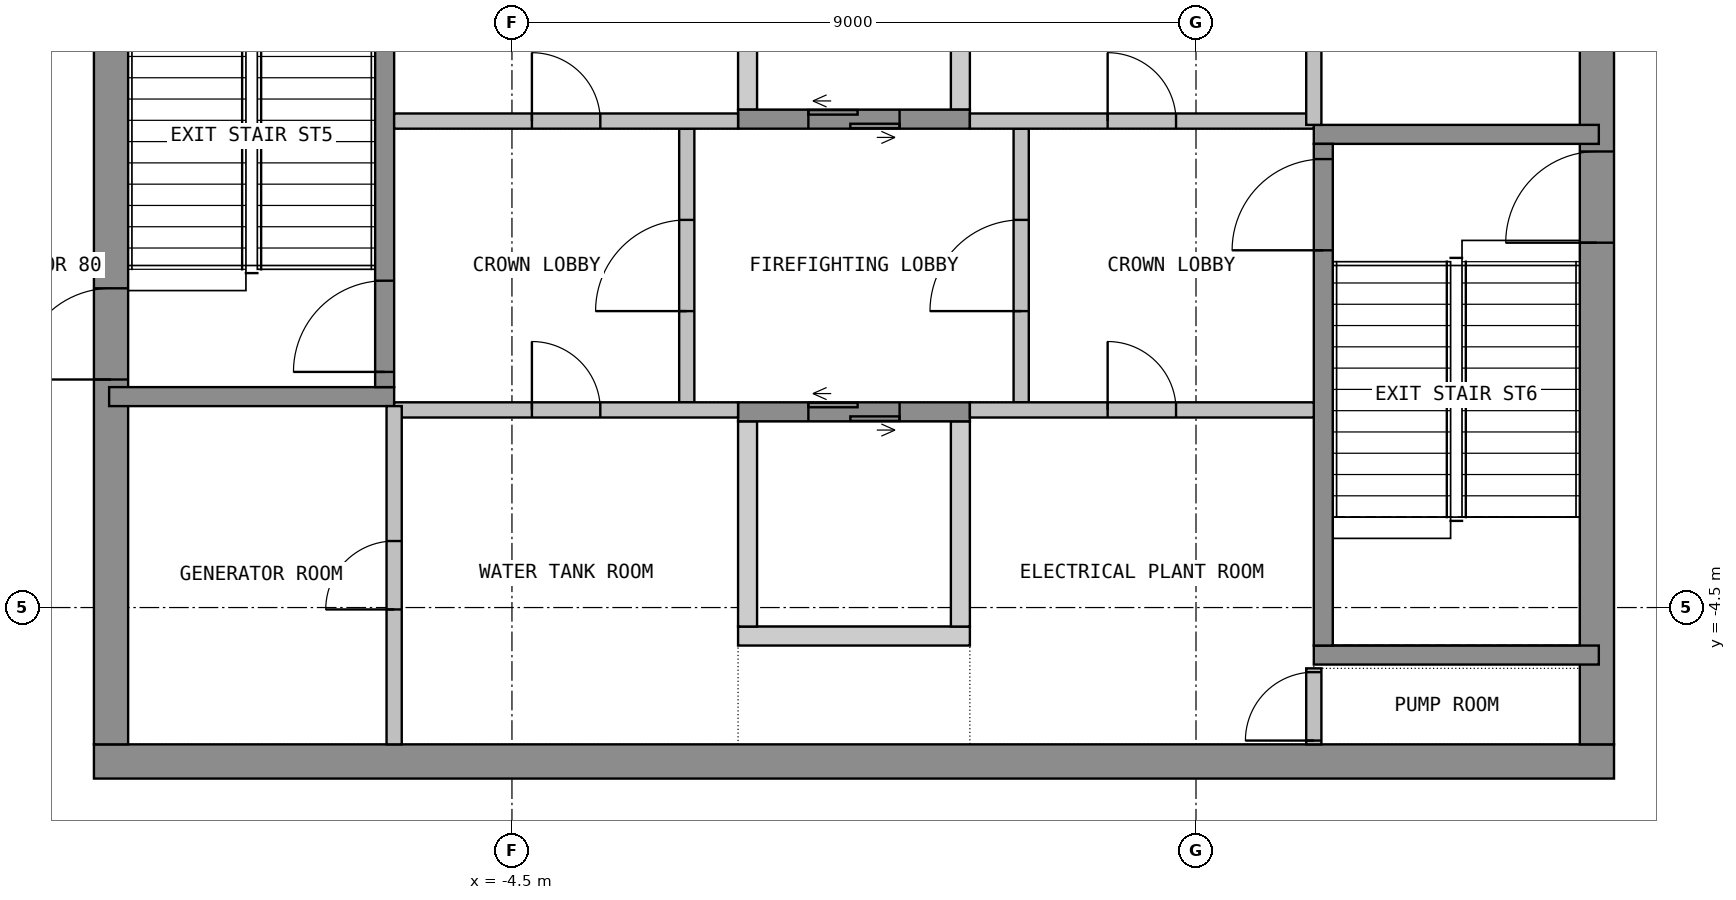
"""IFC4 building model, lengths in metres.
Left out: names, types, materials, properties, quantities, classifications, styles, units other than length and angle.
Written with IfcOpenShell. Run it as: python <this file> out.ifc"""

import sys

from ifc_helpers import new_model, si_unit, direction, frame, frame_2d, origin, place, context, subcontext, project, spatial, polyline, rectangle, outline, extrude, element, fill, save


model = new_model("IFC4")
c1 = context("Model", 3, precision=1e-05, world=origin(), true_north=direction((0.0, 1.0)))
c2 = subcontext(c1, "Body", "Model", "MODEL_VIEW")
j1 = project(units=[si_unit("LENGTHUNIT", "METRE"), si_unit("PLANEANGLEUNIT", "RADIAN")], contexts=[c1])
p1 = place(None, origin())
s1 = spatial("IfcSite", under=j1, at=p1, CompositionType="ELEMENT")
p2 = place(p1, origin())
s2 = spatial("IfcBuilding", under=s1, at=p2, CompositionType="ELEMENT")
p3 = place(p2, frame((0.0, 0.0, 327.9)))
s3 = spatial("IfcBuildingStorey", under=s2, at=p3, CompositionType="ELEMENT", Elevation=327.9)
p4 = place(p3, frame((-10.0, -6.525, 0.0), z_axis=(0.0, 0.0, 1.0), x_axis=(1.0, 0.0, 0.0)))
e1 = element("IfcWall", 1, at=p4, inside=s3, PredefinedType="SHEAR", context=c2, shape_type="SweptSolid", body=[
    extrude(rectangle(XDim=20.0, YDim=0.45, at=frame_2d((10.0, 0.0))), origin(), (0.0, 0.0, 1.0), 3.6),
])
p5 = place(p3, frame((-9.775, -6.3, 0.0), z_axis=(0.0, 0.0, 1.0), x_axis=(0.0, 1.0, 0.0)))
e2 = element("IfcWall", 2, at=p5, inside=s3, PredefinedType="SHEAR", context=c2, shape_type="SweptSolid", body=[
    extrude(rectangle(XDim=12.6, YDim=0.45, at=frame_2d((6.3, 0.0))), origin(), (0.0, 0.0, 1.0), 3.6),
])
p6 = place(p5, frame((4.8, 0.0, 0.0)))
e3 = element("IfcOpeningElement", 3, at=p6, cuts=e2, PredefinedType="OPENING", context=c2, shape_type="SweptSolid", body=[
    extrude(rectangle(XDim=1.2, YDim=2.1, at=frame_2d((0.6, 1.05))), frame((0.0, 0.235, 0.0), z_axis=(0.0, -1.0, 0.0), x_axis=(1.0, 0.0, 0.0)), (0.0, 0.0, 1.0), 0.47),
])
p7 = place(p3, frame((9.775, -6.3, 0.0), z_axis=(0.0, 0.0, 1.0), x_axis=(0.0, 1.0, 0.0)))
e4 = element("IfcWall", 4, at=p7, inside=s3, PredefinedType="SHEAR", context=c2, shape_type="SweptSolid", body=[
    extrude(rectangle(XDim=12.6, YDim=0.45, at=frame_2d((6.3, 0.0))), origin(), (0.0, 0.0, 1.0), 3.6),
])
p8 = place(p7, frame((6.6, 0.0, 0.0)))
e5 = element("IfcOpeningElement", 5, at=p8, cuts=e4, PredefinedType="OPENING", context=c2, shape_type="SweptSolid", body=[
    extrude(rectangle(XDim=1.2, YDim=2.1, at=frame_2d((0.6, 1.05))), frame((0.0, 0.235, 0.0), z_axis=(0.0, -1.0, 0.0), x_axis=(1.0, 0.0, 0.0)), (0.0, 0.0, 1.0), 0.47),
])
p9 = place(p3, origin())
e6 = element("IfcWall", 6, at=p9, inside=s3, PredefinedType="SHEAR", context=c2, shape_type="SweptSolid", body=[
    extrude(outline(polyline([(-1.525, 2.05), (-1.275, 2.05), (-1.275, 4.75), (-1.525, 4.75), (-1.525, 2.05)])), origin(), (0.0, 0.0, 1.0), 3.6),
])
p10 = place(p3, origin())
e7 = element("IfcWall", 7, at=p10, inside=s3, PredefinedType="SHEAR", context=c2, shape_type="SweptSolid", body=[
    extrude(outline(polyline([(1.275, 2.05), (1.525, 2.05), (1.525, 4.75), (1.275, 4.75), (1.275, 2.05)])), origin(), (0.0, 0.0, 1.0), 3.6),
])
p11 = place(p3, frame((-1.525, 1.925, 0.0), z_axis=(0.0, 0.0, 1.0), x_axis=(1.0, 0.0, 0.0)))
e8 = element("IfcWall", 8, at=p11, inside=s3, PredefinedType="SHEAR", context=c2, shape_type="SweptSolid", body=[
    extrude(rectangle(XDim=3.05, YDim=0.25, at=frame_2d((1.525, 0.0))), origin(), (0.0, 0.0, 1.0), 3.6),
])
p12 = place(p11, frame((0.925, 0.0, 0.0)))
e9 = element("IfcOpeningElement", 9, at=p12, cuts=e8, PredefinedType="OPENING", context=c2, shape_type="SweptSolid", body=[
    extrude(rectangle(XDim=1.2, YDim=2.1, at=frame_2d((0.6, 1.05))), frame((0.0, 0.135, 0.0), z_axis=(0.0, -1.0, 0.0), x_axis=(1.0, 0.0, 0.0)), (0.0, 0.0, 1.0), 0.27),
])
p13 = place(p3, origin())
e10 = element("IfcWall", 10, at=p13, inside=s3, PredefinedType="SHEAR", context=c2, shape_type="SweptSolid", body=[
    extrude(outline(polyline([(-1.525, -5.0), (1.525, -5.0), (1.525, -4.75), (-1.525, -4.75), (-1.525, -5.0)])), origin(), (0.0, 0.0, 1.0), 3.6),
])
p14 = place(p3, origin())
e11 = element("IfcWall", 11, at=p14, inside=s3, PredefinedType="SHEAR", context=c2, shape_type="SweptSolid", body=[
    extrude(outline(polyline([(-1.525, -4.75), (-1.275, -4.75), (-1.275, -2.05), (-1.525, -2.05), (-1.525, -4.75)])), origin(), (0.0, 0.0, 1.0), 3.6),
])
p15 = place(p3, origin())
e12 = element("IfcWall", 12, at=p15, inside=s3, PredefinedType="SHEAR", context=c2, shape_type="SweptSolid", body=[
    extrude(outline(polyline([(1.275, -4.75), (1.525, -4.75), (1.525, -2.05), (1.275, -2.05), (1.275, -4.75)])), origin(), (0.0, 0.0, 1.0), 3.6),
])
p16 = place(p3, frame((-1.525, -1.925, 0.0), z_axis=(0.0, 0.0, 1.0), x_axis=(1.0, 0.0, 0.0)))
e13 = element("IfcWall", 13, at=p16, inside=s3, PredefinedType="SHEAR", context=c2, shape_type="SweptSolid", body=[
    extrude(rectangle(XDim=3.05, YDim=0.25, at=frame_2d((1.525, 0.0))), origin(), (0.0, 0.0, 1.0), 3.6),
])
p17 = place(p16, frame((0.925, 0.0, 0.0)))
e14 = element("IfcOpeningElement", 14, at=p17, cuts=e13, PredefinedType="OPENING", context=c2, shape_type="SweptSolid", body=[
    extrude(rectangle(XDim=1.2, YDim=2.1, at=frame_2d((0.6, 1.05))), frame((0.0, 0.135, 0.0), z_axis=(0.0, -1.0, 0.0), x_axis=(1.0, 0.0, 0.0)), (0.0, 0.0, 1.0), 0.27),
])
p18 = place(p3, frame((-2.2, -1.8, 0.0), z_axis=(0.0, 0.0, 1.0), x_axis=(0.0, 1.0, 0.0)))
e15 = element("IfcWall", 15, at=p18, inside=s3, PredefinedType="PARTITIONING", context=c2, shape_type="SweptSolid", body=[
    extrude(rectangle(XDim=3.6, YDim=0.2, at=frame_2d((1.8, 0.0))), origin(), (0.0, 0.0, 1.0), 3.6),
])
p19 = place(p18, frame((1.2, 0.0, 0.0)))
e16 = element("IfcOpeningElement", 16, at=p19, cuts=e15, PredefinedType="OPENING", context=c2, shape_type="SweptSolid", body=[
    extrude(rectangle(XDim=1.2, YDim=2.1, at=frame_2d((0.6, 1.05))), frame((0.0, 0.11, 0.0), z_axis=(0.0, -1.0, 0.0), x_axis=(1.0, 0.0, 0.0)), (0.0, 0.0, 1.0), 0.22),
])
p20 = place(p3, frame((2.2, -1.8, 0.0), z_axis=(0.0, 0.0, 1.0), x_axis=(0.0, 1.0, 0.0)))
e17 = element("IfcWall", 17, at=p20, inside=s3, PredefinedType="PARTITIONING", context=c2, shape_type="SweptSolid", body=[
    extrude(rectangle(XDim=3.6, YDim=0.2, at=frame_2d((1.8, 0.0))), origin(), (0.0, 0.0, 1.0), 3.6),
])
p21 = place(p20, frame((1.2, 0.0, 0.0)))
e18 = element("IfcOpeningElement", 18, at=p21, cuts=e17, PredefinedType="OPENING", context=c2, shape_type="SweptSolid", body=[
    extrude(rectangle(XDim=1.2, YDim=2.1, at=frame_2d((0.6, 1.05))), frame((0.0, 0.11, 0.0), z_axis=(0.0, -1.0, 0.0), x_axis=(1.0, 0.0, 0.0)), (0.0, 0.0, 1.0), 0.22),
])
p22 = place(p3, frame((-9.8, -1.725, 0.0), z_axis=(0.0, 0.0, 1.0), x_axis=(1.0, 0.0, 0.0)))
e19 = element("IfcWall", 19, at=p22, inside=s3, PredefinedType="SHEAR", context=c2, shape_type="SweptSolid", body=[
    extrude(rectangle(XDim=3.75, YDim=0.25, at=frame_2d((1.875, 0.0))), origin(), (0.0, 0.0, 1.0), 3.6),
])
p23 = place(p3, frame((-6.175, -1.6, 0.0), z_axis=(0.0, 0.0, 1.0), x_axis=(0.0, 1.0, 0.0)))
e20 = element("IfcWall", 20, at=p23, inside=s3, PredefinedType="SHEAR", context=c2, shape_type="SweptSolid", body=[
    extrude(rectangle(XDim=6.6, YDim=0.25, at=frame_2d((3.3, 0.0))), origin(), (0.0, 0.0, 1.0), 3.6),
])
p24 = place(p23, frame((0.2, 0.0, 0.0)))
e21 = element("IfcOpeningElement", 21, at=p24, cuts=e20, PredefinedType="OPENING", context=c2, shape_type="SweptSolid", body=[
    extrude(rectangle(XDim=1.2, YDim=2.1, at=frame_2d((0.6, 1.05))), frame((0.0, 0.135, 0.0), z_axis=(0.0, -1.0, 0.0), x_axis=(1.0, 0.0, 0.0)), (0.0, 0.0, 1.0), 0.27),
])
for number, where, z_axis, x_axis in (
    (22, (6.05, -5.125, 0.0), (0.0, 0.0, 1.0), (1.0, 0.0, 0.0)),
    (23, (6.05, 1.725, 0.0), (0.0, 0.0, 1.0), (1.0, 0.0, 0.0)),
):
    element("IfcWall", number, at=place(p3, frame(where, z_axis=z_axis, x_axis=x_axis)), inside=s3, PredefinedType="SHEAR", context=c2, shape_type="SweptSolid", body=[
        extrude(rectangle(XDim=3.75, YDim=0.25, at=frame_2d((1.875, 0.0))), origin(), (0.0, 0.0, 1.0), 3.6),
    ])
p25 = place(p3, frame((6.175, -5.0, 0.0), z_axis=(0.0, 0.0, 1.0), x_axis=(0.0, 1.0, 0.0)))
e24 = element("IfcWall", 24, at=p25, inside=s3, PredefinedType="SHEAR", context=c2, shape_type="SweptSolid", body=[
    extrude(rectangle(XDim=6.6, YDim=0.25, at=frame_2d((3.3, 0.0))), origin(), (0.0, 0.0, 1.0), 3.6),
])
p26 = place(p25, frame((5.2, 0.0, 0.0)))
e25 = element("IfcOpeningElement", 25, at=p26, cuts=e24, PredefinedType="OPENING", context=c2, shape_type="SweptSolid", body=[
    extrude(rectangle(XDim=1.2, YDim=2.1, at=frame_2d((0.6, 1.05))), frame((0.0, 0.135, 0.0), z_axis=(0.0, -1.0, 0.0), x_axis=(1.0, 0.0, 0.0)), (0.0, 0.0, 1.0), 0.27),
])
p27 = place(p3, frame((-6.05, 1.9, 0.0), z_axis=(0.0, 0.0, 1.0), x_axis=(1.0, 0.0, 0.0)))
e26 = element("IfcWall", 26, at=p27, inside=s3, PredefinedType="PARTITIONING", context=c2, shape_type="SweptSolid", body=[
    extrude(rectangle(XDim=4.525, YDim=0.2, at=frame_2d((2.263, 0.0))), origin(), (0.0, 0.0, 1.0), 3.6),
])
p28 = place(p27, frame((1.812, 0.0, 0.0)))
e27 = element("IfcOpeningElement", 27, at=p28, cuts=e26, PredefinedType="OPENING", context=c2, shape_type="SweptSolid", body=[
    extrude(rectangle(XDim=0.9, YDim=2.1, at=frame_2d((0.45, 1.05))), frame((0.0, 0.11, 0.0), z_axis=(0.0, -1.0, 0.0), x_axis=(1.0, 0.0, 0.0)), (0.0, 0.0, 1.0), 0.22),
])
p29 = place(p3, frame((-6.05, -1.9, 0.0), z_axis=(0.0, 0.0, 1.0), x_axis=(1.0, 0.0, 0.0)))
e28 = element("IfcWall", 28, at=p29, inside=s3, PredefinedType="PARTITIONING", context=c2, shape_type="SweptSolid", body=[
    extrude(rectangle(XDim=4.525, YDim=0.2, at=frame_2d((2.263, 0.0))), origin(), (0.0, 0.0, 1.0), 3.6),
])
p30 = place(p29, frame((1.812, 0.0, 0.0)))
e29 = element("IfcOpeningElement", 29, at=p30, cuts=e28, PredefinedType="OPENING", context=c2, shape_type="SweptSolid", body=[
    extrude(rectangle(XDim=0.9, YDim=2.1, at=frame_2d((0.45, 1.05))), frame((0.0, 0.11, 0.0), z_axis=(0.0, -1.0, 0.0), x_axis=(1.0, 0.0, 0.0)), (0.0, 0.0, 1.0), 0.22),
])
p31 = place(p3, frame((1.525, 1.9, 0.0), z_axis=(0.0, 0.0, 1.0), x_axis=(1.0, 0.0, 0.0)))
e30 = element("IfcWall", 30, at=p31, inside=s3, PredefinedType="PARTITIONING", context=c2, shape_type="SweptSolid", body=[
    extrude(rectangle(XDim=4.525, YDim=0.2, at=frame_2d((2.263, 0.0))), origin(), (0.0, 0.0, 1.0), 3.6),
])
p32 = place(p31, frame((1.812, 0.0, 0.0)))
e31 = element("IfcOpeningElement", 31, at=p32, cuts=e30, PredefinedType="OPENING", context=c2, shape_type="SweptSolid", body=[
    extrude(rectangle(XDim=0.9, YDim=2.1, at=frame_2d((0.45, 1.05))), frame((0.0, 0.11, 0.0), z_axis=(0.0, -1.0, 0.0), x_axis=(1.0, 0.0, 0.0)), (0.0, 0.0, 1.0), 0.22),
])
p33 = place(p3, frame((1.525, -1.9, 0.0), z_axis=(0.0, 0.0, 1.0), x_axis=(1.0, 0.0, 0.0)))
e32 = element("IfcWall", 32, at=p33, inside=s3, PredefinedType="PARTITIONING", context=c2, shape_type="SweptSolid", body=[
    extrude(rectangle(XDim=4.525, YDim=0.2, at=frame_2d((2.263, 0.0))), origin(), (0.0, 0.0, 1.0), 3.6),
])
p34 = place(p33, frame((1.812, 0.0, 0.0)))
e33 = element("IfcOpeningElement", 33, at=p34, cuts=e32, PredefinedType="OPENING", context=c2, shape_type="SweptSolid", body=[
    extrude(rectangle(XDim=0.9, YDim=2.1, at=frame_2d((0.45, 1.05))), frame((0.0, 0.11, 0.0), z_axis=(0.0, -1.0, 0.0), x_axis=(1.0, 0.0, 0.0)), (0.0, 0.0, 1.0), 0.22),
])
p35 = place(p3, frame((-6.05, -6.3, 0.0), z_axis=(0.0, 0.0, 1.0), x_axis=(0.0, 1.0, 0.0)))
e34 = element("IfcWall", 34, at=p35, inside=s3, PredefinedType="PARTITIONING", context=c2, shape_type="SweptSolid", body=[
    extrude(rectangle(XDim=4.45, YDim=0.2, at=frame_2d((2.225, 0.0))), origin(), (0.0, 0.0, 1.0), 3.6),
])
p36 = place(p35, frame((1.775, 0.0, 0.0)))
e35 = element("IfcOpeningElement", 35, at=p36, cuts=e34, PredefinedType="OPENING", context=c2, shape_type="SweptSolid", body=[
    extrude(rectangle(XDim=0.9, YDim=2.1, at=frame_2d((0.45, 1.05))), frame((0.0, 0.11, 0.0), z_axis=(0.0, -1.0, 0.0), x_axis=(1.0, 0.0, 0.0)), (0.0, 0.0, 1.0), 0.22),
])
p37 = place(p3, frame((6.05, 1.85, 0.0), z_axis=(0.0, 0.0, 1.0), x_axis=(0.0, 1.0, 0.0)))
e36 = element("IfcWall", 36, at=p37, inside=s3, PredefinedType="PARTITIONING", context=c2, shape_type="SweptSolid", body=[
    extrude(rectangle(XDim=4.45, YDim=0.2, at=frame_2d((2.225, 0.0))), origin(), (0.0, 0.0, 1.0), 3.6),
])
p38 = place(p37, frame((1.775, 0.0, 0.0)))
e37 = element("IfcOpeningElement", 37, at=p38, cuts=e36, PredefinedType="OPENING", context=c2, shape_type="SweptSolid", body=[
    extrude(rectangle(XDim=0.9, YDim=2.1, at=frame_2d((0.45, 1.05))), frame((0.0, 0.11, 0.0), z_axis=(0.0, -1.0, 0.0), x_axis=(1.0, 0.0, 0.0)), (0.0, 0.0, 1.0), 0.22),
])
p39 = place(p3, frame((6.05, -6.3, 0.0), z_axis=(0.0, 0.0, 1.0), x_axis=(0.0, 1.0, 0.0)))
e38 = element("IfcWall", 38, at=p39, inside=s3, PredefinedType="PARTITIONING", context=c2, shape_type="SweptSolid", body=[
    extrude(rectangle(XDim=1.0, YDim=0.2, at=frame_2d((0.5, 0.0))), origin(), (0.0, 0.0, 1.0), 3.6),
])
p40 = place(p39, frame((0.05, 0.0, 0.0)))
e39 = element("IfcOpeningElement", 39, at=p40, cuts=e38, PredefinedType="OPENING", context=c2, shape_type="SweptSolid", body=[
    extrude(rectangle(XDim=0.9, YDim=2.1, at=frame_2d((0.45, 1.05))), frame((0.0, 0.11, 0.0), z_axis=(0.0, -1.0, 0.0), x_axis=(1.0, 0.0, 0.0)), (0.0, 0.0, 1.0), 0.22),
])
p41 = place(p6, origin())
e40 = element("IfcDoor", 40, at=p41, inside=s3, OperationType="SINGLE_SWING_RIGHT", PredefinedType="DOOR", context=c2, shape_type="SweptSolid", body=[
    extrude(rectangle(XDim=1.2, YDim=2.1, at=frame_2d((0.6, 1.05))), frame((0.0, 0.025, 0.0), z_axis=(0.0, -1.0, 0.0), x_axis=(1.0, 0.0, 0.0)), (0.0, 0.0, 1.0), 0.05),
])
fill(e3, e40)
p42 = place(p8, origin())
e41 = element("IfcDoor", 41, at=p42, inside=s3, OperationType="SINGLE_SWING_RIGHT", PredefinedType="DOOR", context=c2, shape_type="SweptSolid", body=[
    extrude(rectangle(XDim=1.2, YDim=2.1, at=frame_2d((0.6, 1.05))), frame((0.0, 0.025, 0.0), z_axis=(0.0, -1.0, 0.0), x_axis=(1.0, 0.0, 0.0)), (0.0, 0.0, 1.0), 0.05),
])
fill(e5, e41)
p43 = place(p12, origin())
e42 = element("IfcDoor", 42, at=p43, inside=s3, OperationType="DOUBLE_DOOR_SLIDING", PredefinedType="DOOR", context=c2, shape_type="SweptSolid", body=[
    extrude(rectangle(XDim=1.2, YDim=2.1, at=frame_2d((0.6, 1.05))), frame((0.0, 0.025, 0.0), z_axis=(0.0, -1.0, 0.0), x_axis=(1.0, 0.0, 0.0)), (0.0, 0.0, 1.0), 0.05),
])
fill(e9, e42)
p44 = place(p17, origin())
e43 = element("IfcDoor", 43, at=p44, inside=s3, OperationType="DOUBLE_DOOR_SLIDING", PredefinedType="DOOR", context=c2, shape_type="SweptSolid", body=[
    extrude(rectangle(XDim=1.2, YDim=2.1, at=frame_2d((0.6, 1.05))), frame((0.0, 0.025, 0.0), z_axis=(0.0, -1.0, 0.0), x_axis=(1.0, 0.0, 0.0)), (0.0, 0.0, 1.0), 0.05),
])
fill(e14, e43)
p45 = place(p19, origin())
e44 = element("IfcDoor", 44, at=p45, inside=s3, OperationType="SINGLE_SWING_LEFT", PredefinedType="DOOR", context=c2, shape_type="SweptSolid", body=[
    extrude(rectangle(XDim=1.2, YDim=2.1, at=frame_2d((0.6, 1.05))), frame((0.0, 0.025, 0.0), z_axis=(0.0, -1.0, 0.0), x_axis=(1.0, 0.0, 0.0)), (0.0, 0.0, 1.0), 0.05),
])
fill(e16, e44)
p46 = place(p21, origin())
e45 = element("IfcDoor", 45, at=p46, inside=s3, OperationType="SINGLE_SWING_LEFT", PredefinedType="DOOR", context=c2, shape_type="SweptSolid", body=[
    extrude(rectangle(XDim=1.2, YDim=2.1, at=frame_2d((0.6, 1.05))), frame((0.0, 0.025, 0.0), z_axis=(0.0, -1.0, 0.0), x_axis=(1.0, 0.0, 0.0)), (0.0, 0.0, 1.0), 0.05),
])
fill(e18, e45)
p47 = place(p24, origin())
e46 = element("IfcDoor", 46, at=p47, inside=s3, OperationType="SINGLE_SWING_LEFT", PredefinedType="DOOR", context=c2, shape_type="SweptSolid", body=[
    extrude(rectangle(XDim=1.2, YDim=2.1, at=frame_2d((0.6, 1.05))), frame((0.0, 0.025, 0.0), z_axis=(0.0, -1.0, 0.0), x_axis=(1.0, 0.0, 0.0)), (0.0, 0.0, 1.0), 0.05),
])
fill(e21, e46)
p48 = place(p26, origin())
e47 = element("IfcDoor", 47, at=p48, inside=s3, OperationType="SINGLE_SWING_LEFT", PredefinedType="DOOR", context=c2, shape_type="SweptSolid", body=[
    extrude(rectangle(XDim=1.2, YDim=2.1, at=frame_2d((0.6, 1.05))), frame((0.0, 0.025, 0.0), z_axis=(0.0, -1.0, 0.0), x_axis=(1.0, 0.0, 0.0)), (0.0, 0.0, 1.0), 0.05),
])
fill(e25, e47)
p49 = place(p28, origin())
e48 = element("IfcDoor", 48, at=p49, inside=s3, OperationType="SINGLE_SWING_LEFT", PredefinedType="DOOR", context=c2, shape_type="SweptSolid", body=[
    extrude(rectangle(XDim=0.9, YDim=2.1, at=frame_2d((0.45, 1.05))), frame((0.0, 0.025, 0.0), z_axis=(0.0, -1.0, 0.0), x_axis=(1.0, 0.0, 0.0)), (0.0, 0.0, 1.0), 0.05),
])
fill(e27, e48)
p50 = place(p30, origin())
e49 = element("IfcDoor", 49, at=p50, inside=s3, OperationType="SINGLE_SWING_LEFT", PredefinedType="DOOR", context=c2, shape_type="SweptSolid", body=[
    extrude(rectangle(XDim=0.9, YDim=2.1, at=frame_2d((0.45, 1.05))), frame((0.0, 0.025, 0.0), z_axis=(0.0, -1.0, 0.0), x_axis=(1.0, 0.0, 0.0)), (0.0, 0.0, 1.0), 0.05),
])
fill(e29, e49)
p51 = place(p32, origin())
e50 = element("IfcDoor", 50, at=p51, inside=s3, OperationType="SINGLE_SWING_LEFT", PredefinedType="DOOR", context=c2, shape_type="SweptSolid", body=[
    extrude(rectangle(XDim=0.9, YDim=2.1, at=frame_2d((0.45, 1.05))), frame((0.0, 0.025, 0.0), z_axis=(0.0, -1.0, 0.0), x_axis=(1.0, 0.0, 0.0)), (0.0, 0.0, 1.0), 0.05),
])
fill(e31, e50)
p52 = place(p34, origin())
e51 = element("IfcDoor", 51, at=p52, inside=s3, OperationType="SINGLE_SWING_LEFT", PredefinedType="DOOR", context=c2, shape_type="SweptSolid", body=[
    extrude(rectangle(XDim=0.9, YDim=2.1, at=frame_2d((0.45, 1.05))), frame((0.0, 0.025, 0.0), z_axis=(0.0, -1.0, 0.0), x_axis=(1.0, 0.0, 0.0)), (0.0, 0.0, 1.0), 0.05),
])
fill(e33, e51)
p53 = place(p36, origin())
e52 = element("IfcDoor", 52, at=p53, inside=s3, OperationType="SINGLE_SWING_LEFT", PredefinedType="DOOR", context=c2, shape_type="SweptSolid", body=[
    extrude(rectangle(XDim=0.9, YDim=2.1, at=frame_2d((0.45, 1.05))), frame((0.0, 0.025, 0.0), z_axis=(0.0, -1.0, 0.0), x_axis=(1.0, 0.0, 0.0)), (0.0, 0.0, 1.0), 0.05),
])
fill(e35, e52)
p54 = place(p40, origin())
e53 = element("IfcDoor", 53, at=p54, inside=s3, OperationType="SINGLE_SWING_LEFT", PredefinedType="DOOR", context=c2, shape_type="SweptSolid", body=[
    extrude(rectangle(XDim=0.9, YDim=2.1, at=frame_2d((0.45, 1.05))), frame((0.0, 0.025, 0.0), z_axis=(0.0, -1.0, 0.0), x_axis=(1.0, 0.0, 0.0)), (0.0, 0.0, 1.0), 0.05),
])
fill(e39, e53)
save(model, sys.argv[1])
